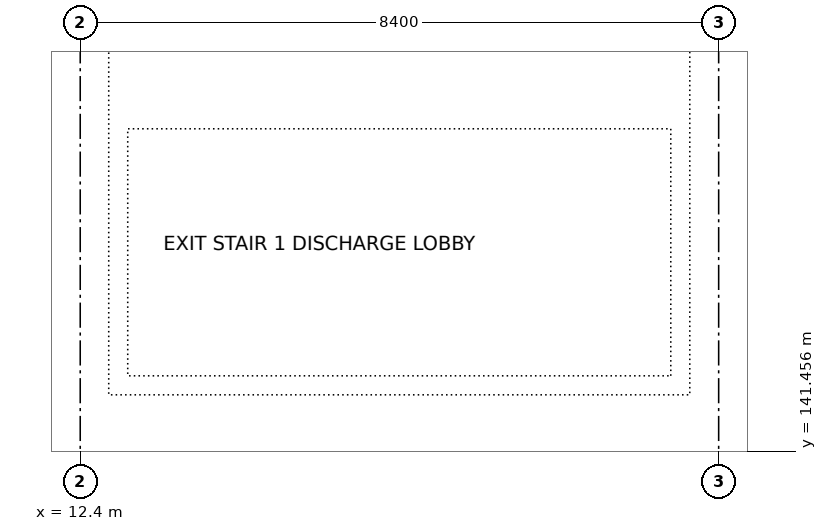
"""IFC4 building model, lengths in metres.
Left out: names, types, materials, properties, quantities, classifications, styles, units other than length and angle.
Written with IfcOpenShell. Run it as: python <this file> out.ifc"""

import sys

from ifc_helpers import new_model, si_unit, direction, frame, frame_2d, origin, place, context, subcontext, project, spatial, rectangle, extrude, element, fill, save


model = new_model("IFC4")
c1 = context("Model", 3, precision=1e-05, world=origin(), true_north=direction((0.0, 1.0)))
c2 = subcontext(c1, "Body", "Model", "MODEL_VIEW")
j1 = project(units=[si_unit("LENGTHUNIT", "METRE"), si_unit("PLANEANGLEUNIT", "RADIAN")], contexts=[c1])
p1 = place(None, origin())
s1 = spatial("IfcSite", under=j1, at=p1, CompositionType="ELEMENT")
p2 = place(p1, origin())
s2 = spatial("IfcBuilding", under=s1, at=p2, CompositionType="ELEMENT")
p3 = place(p2, origin())
s3 = spatial("IfcBuildingStorey", under=s2, at=p3, CompositionType="ELEMENT", Elevation=0.0)
p4 = place(p3, frame((12.9, 142.325, 0.0), z_axis=(0.0, 0.0, 1.0), x_axis=(1.0, 0.0, 0.0)))
e1 = element("IfcWall", 1, at=p4, inside=s3, PredefinedType="SOLIDWALL", context=c2, shape_type="SweptSolid", body=[
    extrude(rectangle(XDim=7.395, YDim=0.25, at=frame_2d((3.698, 0.0))), origin(), (0.0, 0.0, 1.0), 2.8),
])
p5 = place(p4, frame((0.55, 0.0, 0.0)))
e2 = element("IfcOpeningElement", 2, at=p5, cuts=e1, PredefinedType="OPENING", context=c2, shape_type="SweptSolid", body=[
    extrude(rectangle(XDim=1.1, YDim=2.1, at=frame_2d((0.55, 1.05))), frame((0.0, 0.135, 0.0), z_axis=(0.0, -1.0, 0.0), x_axis=(1.0, 0.0, 0.0)), (0.0, 0.0, 1.0), 0.27),
])
p6 = place(p3, frame((12.9, 145.825, 0.0), z_axis=(0.0, 0.0, 1.0), x_axis=(1.0, 0.0, 0.0)))
e3 = element("IfcWall", 3, at=p6, inside=s3, PredefinedType="SOLIDWALL", context=c2, shape_type="SweptSolid", body=[
    extrude(rectangle(XDim=7.395, YDim=0.25, at=frame_2d((3.698, 0.0))), origin(), (0.0, 0.0, 1.0), 2.8),
])
for number, where, z_axis, x_axis in (
    (4, (12.9, 142.325, 0.0), (0.0, 0.0, 1.0), (0.0, 1.0, 0.0)),
    (5, (20.295, 142.325, 0.0), (0.0, 0.0, 1.0), (0.0, 1.0, 0.0)),
):
    element("IfcWall", number, at=place(p3, frame(where, z_axis=z_axis, x_axis=x_axis)), inside=s3, PredefinedType="SOLIDWALL", context=c2, shape_type="SweptSolid", body=[
        extrude(rectangle(XDim=3.5, YDim=0.25, at=frame_2d((1.75, 0.0))), origin(), (0.0, 0.0, 1.0), 2.8),
    ])
p7 = place(p5, frame((1.1, 0.0, 0.0), z_axis=(0.0, 0.0, 1.0), x_axis=(-1.0, 0.0, 0.0)))
e6 = element("IfcDoor", 6, at=p7, inside=s3, OperationType="SINGLE_SWING_LEFT", PredefinedType="DOOR", context=c2, shape_type="SweptSolid", body=[
    extrude(rectangle(XDim=1.1, YDim=2.1, at=frame_2d((0.55, 1.05))), frame((0.0, 0.025, 0.0), z_axis=(0.0, -1.0, 0.0), x_axis=(1.0, 0.0, 0.0)), (0.0, 0.0, 1.0), 0.05),
])
fill(e2, e6)
save(model, sys.argv[1])
